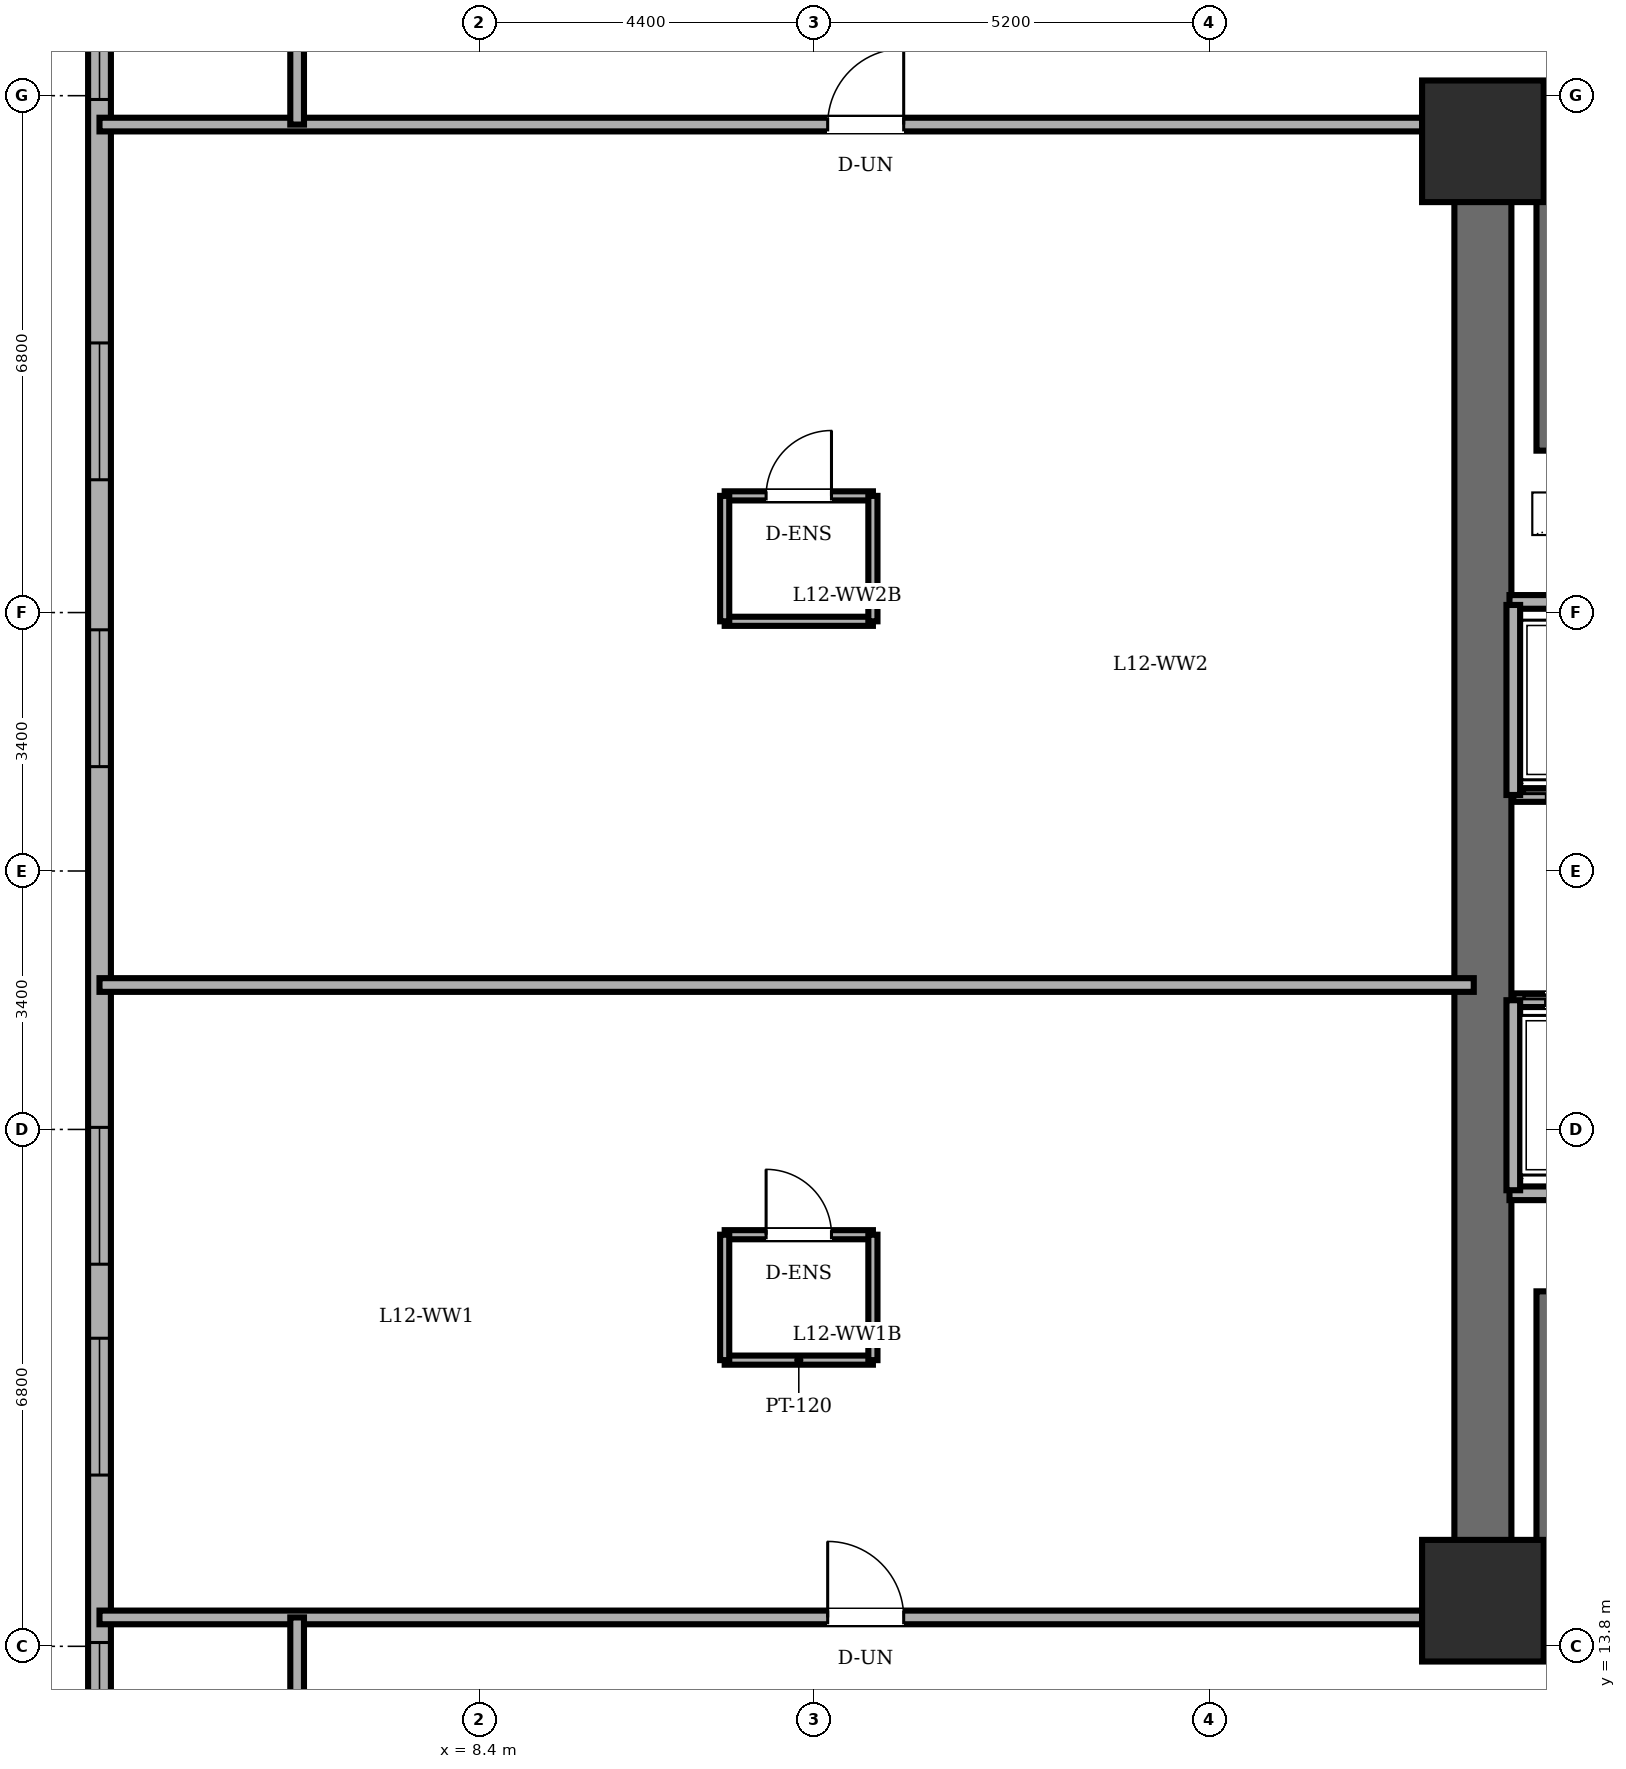
"""IFC4 building model, lengths in metres.
Left out: names, types, materials, properties, quantities, classifications, styles, units other than length and angle.
Written with IfcOpenShell. Run it as: python <this file> out.ifc"""

import sys

from ifc_helpers import new_model, si_unit, direction, frame, frame_2d, origin, origin_2d, place, context, subcontext, project, spatial, rectangle, extrude, element, fill, save


model = new_model("IFC4")
c1 = context("Model", 3, precision=1e-05, world=origin(), true_north=direction((0.0, 1.0)))
c2 = subcontext(c1, "Body", "Model", "MODEL_VIEW")
j1 = project(units=[si_unit("LENGTHUNIT", "METRE"), si_unit("PLANEANGLEUNIT", "RADIAN")], contexts=[c1])
p1 = place(None, origin())
s1 = spatial("IfcSite", under=j1, at=p1, CompositionType="ELEMENT")
p2 = place(p1, origin())
s2 = spatial("IfcBuilding", under=s1, at=p2, CompositionType="ELEMENT")
p3 = place(p2, frame((0.0, 0.0, 46.8)))
s3 = spatial("IfcBuildingStorey", under=s2, at=p3, CompositionType="ELEMENT", Elevation=46.8)
for number, where, z_axis, x_axis in (
    (1, (21.6, 14.4, 0.0), (0.0, 0.0, 1.0), (1.0, 0.0, 0.0)),
    (2, (21.6, 33.6, 0.0), (0.0, 0.0, 1.0), (1.0, 0.0, 0.0)),
):
    element("IfcColumn", number, at=place(p3, frame(where, z_axis=z_axis, x_axis=x_axis)), inside=s3, PredefinedType="COLUMN", context=c2, shape_type="SweptSolid", body=[
        extrude(rectangle(XDim=1.6, YDim=1.6, at=origin_2d()), origin(), (0.0, 0.0, 1.0), 3.6),
    ])
p4 = place(p3, frame((3.4, 40.2, 0.0), z_axis=(0.0, 0.0, 1.0), x_axis=(0.0, -1.0, 0.0)))
e3 = element("IfcWall", 3, at=p4, inside=s3, PredefinedType="SOLIDWALL", context=c2, shape_type="SweptSolid", body=[
    extrude(rectangle(XDim=32.4, YDim=0.3, at=frame_2d((16.2, 0.0))), origin(), (0.0, 0.0, 1.0), 3.4),
])
p5 = place(p4, frame((1.235, 0.0, 0.85)))
e4 = element("IfcOpeningElement", 4, at=p5, cuts=e3, PredefinedType="OPENING", context=c2, shape_type="SweptSolid", body=[
    extrude(rectangle(XDim=1.8, YDim=1.55, at=frame_2d((0.9, 0.775))), frame((0.0, 0.16, 0.0), z_axis=(0.0, -1.0, 0.0), x_axis=(1.0, 0.0, 0.0)), (0.0, 0.0, 1.0), 0.32),
])
p6 = place(p4, frame((4.25, 0.0, 0.85)))
e5 = element("IfcOpeningElement", 5, at=p6, cuts=e3, PredefinedType="OPENING", context=c2, shape_type="SweptSolid", body=[
    extrude(rectangle(XDim=1.8, YDim=1.55, at=frame_2d((0.9, 0.775))), frame((0.0, 0.16, 0.0), z_axis=(0.0, -1.0, 0.0), x_axis=(1.0, 0.0, 0.0)), (0.0, 0.0, 1.0), 0.32),
])
p7 = place(p4, frame((9.253, 0.0, 0.85)))
e6 = element("IfcOpeningElement", 6, at=p7, cuts=e3, PredefinedType="OPENING", context=c2, shape_type="SweptSolid", body=[
    extrude(rectangle(XDim=1.8, YDim=1.55, at=frame_2d((0.9, 0.775))), frame((0.0, 0.16, 0.0), z_axis=(0.0, -1.0, 0.0), x_axis=(1.0, 0.0, 0.0)), (0.0, 0.0, 1.0), 0.32),
])
p8 = place(p4, frame((13.027, 0.0, 0.85)))
e7 = element("IfcOpeningElement", 7, at=p8, cuts=e3, PredefinedType="OPENING", context=c2, shape_type="SweptSolid", body=[
    extrude(rectangle(XDim=1.8, YDim=1.55, at=frame_2d((0.9, 0.775))), frame((0.0, 0.16, 0.0), z_axis=(0.0, -1.0, 0.0), x_axis=(1.0, 0.0, 0.0)), (0.0, 0.0, 1.0), 0.32),
])
p9 = place(p4, frame((19.573, 0.0, 0.85)))
e8 = element("IfcOpeningElement", 8, at=p9, cuts=e3, PredefinedType="OPENING", context=c2, shape_type="SweptSolid", body=[
    extrude(rectangle(XDim=1.8, YDim=1.55, at=frame_2d((0.9, 0.775))), frame((0.0, 0.16, 0.0), z_axis=(0.0, -1.0, 0.0), x_axis=(1.0, 0.0, 0.0)), (0.0, 0.0, 1.0), 0.32),
])
p10 = place(p4, frame((22.347, 0.0, 0.85)))
e9 = element("IfcOpeningElement", 9, at=p10, cuts=e3, PredefinedType="OPENING", context=c2, shape_type="SweptSolid", body=[
    extrude(rectangle(XDim=1.8, YDim=1.55, at=frame_2d((0.9, 0.775))), frame((0.0, 0.16, 0.0), z_axis=(0.0, -1.0, 0.0), x_axis=(1.0, 0.0, 0.0)), (0.0, 0.0, 1.0), 0.32),
])
p11 = place(p4, frame((26.35, 0.0, 0.85)))
e10 = element("IfcOpeningElement", 10, at=p11, cuts=e3, PredefinedType="OPENING", context=c2, shape_type="SweptSolid", body=[
    extrude(rectangle(XDim=1.8, YDim=1.55, at=frame_2d((0.9, 0.775))), frame((0.0, 0.16, 0.0), z_axis=(0.0, -1.0, 0.0), x_axis=(1.0, 0.0, 0.0)), (0.0, 0.0, 1.0), 0.32),
])
p12 = place(p4, frame((29.365, 0.0, 0.85)))
e11 = element("IfcOpeningElement", 11, at=p12, cuts=e3, PredefinedType="OPENING", context=c2, shape_type="SweptSolid", body=[
    extrude(rectangle(XDim=1.8, YDim=1.55, at=frame_2d((0.9, 0.775))), frame((0.0, 0.16, 0.0), z_axis=(0.0, -1.0, 0.0), x_axis=(1.0, 0.0, 0.0)), (0.0, 0.0, 1.0), 0.32),
])
p13 = place(p3, frame((21.6, 14.4, 0.0), z_axis=(0.0, 0.0, 1.0), x_axis=(0.0, 1.0, 0.0)))
e12 = element("IfcWall", 12, at=p13, inside=s3, PredefinedType="SHEAR", context=c2, shape_type="SweptSolid", body=[
    extrude(rectangle(XDim=19.2, YDim=0.75, at=frame_2d((9.6, 0.0))), origin(), (0.0, 0.0, 1.0), 3.4),
])
for number, where, z_axis, x_axis in (
    (13, (21.6, 33.6, 0.0), (0.0, 0.0, 1.0), (1.0, 0.0, 0.0)),
    (14, (37.2, 14.4, 0.0), (0.0, 0.0, 1.0), (-1.0, 0.0, 0.0)),
):
    element("IfcWall", number, at=place(p3, frame(where, z_axis=z_axis, x_axis=x_axis)), inside=s3, PredefinedType="SHEAR", context=c2, shape_type="SweptSolid", body=[
        extrude(rectangle(XDim=15.6, YDim=0.75, at=frame_2d((7.8, 0.0))), origin(), (0.0, 0.0, 1.0), 3.4),
    ])
for number, where, z_axis, x_axis in (
    (15, (22.48, 29.53, 0.0), (0.0, 0.0, 1.0), (0.0, 1.0, 0.0)),
    (16, (22.48, 14.89, 0.0), (0.0, 0.0, 1.0), (0.0, 1.0, 0.0)),
):
    element("IfcWall", number, at=place(p3, frame(where, z_axis=z_axis, x_axis=x_axis)), inside=s3, PredefinedType="SOLIDWALL", context=c2, shape_type="SweptSolid", body=[
        extrude(rectangle(XDim=3.58, YDim=0.35, at=frame_2d((1.79, 0.0))), origin(), (0.0, 0.0, 1.0), 3.4),
    ])
p14 = place(p3, frame((21.95, 27.54, 0.0), z_axis=(0.0, 0.0, 1.0), x_axis=(1.0, 0.0, 0.0)))
e17 = element("IfcWall", 17, at=p14, inside=s3, PredefinedType="PARTITIONING", context=c2, shape_type="SweptSolid", body=[
    extrude(rectangle(XDim=10.56, YDim=0.18, at=frame_2d((5.28, 0.0))), origin(), (0.0, 0.0, 1.0), 3.4),
])
p15 = place(p3, frame((21.95, 19.76, 0.0), z_axis=(0.0, 0.0, 1.0), x_axis=(1.0, 0.0, 0.0)))
e18 = element("IfcWall", 18, at=p15, inside=s3, PredefinedType="PARTITIONING", context=c2, shape_type="SweptSolid", body=[
    extrude(rectangle(XDim=14.87, YDim=0.18, at=frame_2d((7.435, 0.0))), origin(), (0.0, 0.0, 1.0), 3.4),
])
p16 = place(p3, frame((24.02, 25.0, 0.0), z_axis=(0.0, 0.0, 1.0), x_axis=(-1.0, 0.0, 0.0)))
e19 = element("IfcWall", 19, at=p16, inside=s3, PredefinedType="PARTITIONING", context=c2, shape_type="SweptSolid", body=[
    extrude(rectangle(XDim=2.02, YDim=0.18, at=frame_2d((1.01, 0.0))), origin(), (0.0, 0.0, 1.0), 3.4),
])
p17 = place(p16, frame((0.435, 0.0, 0.0)))
e20 = element("IfcOpeningElement", 20, at=p17, cuts=e19, PredefinedType="OPENING", context=c2, shape_type="SweptSolid", body=[
    extrude(rectangle(XDim=1.15, YDim=2.2, at=frame_2d((0.575, 1.1))), frame((0.0, 0.1, 0.0), z_axis=(0.0, -1.0, 0.0), x_axis=(1.0, 0.0, 0.0)), (0.0, 0.0, 1.0), 0.2),
])
p18 = place(p3, frame((22.0, 27.5, 0.0), z_axis=(0.0, 0.0, 1.0), x_axis=(0.0, -1.0, 0.0)))
e21 = element("IfcWall", 21, at=p18, inside=s3, PredefinedType="PARTITIONING", context=c2, shape_type="SweptSolid", body=[
    extrude(rectangle(XDim=2.5, YDim=0.18, at=frame_2d((1.25, 0.0))), origin(), (0.0, 0.0, 1.0), 3.4),
])
p19 = place(p3, frame((22.0, 22.3, 0.0), z_axis=(0.0, 0.0, 1.0), x_axis=(1.0, 0.0, 0.0)))
e22 = element("IfcWall", 22, at=p19, inside=s3, PredefinedType="PARTITIONING", context=c2, shape_type="SweptSolid", body=[
    extrude(rectangle(XDim=2.0, YDim=0.18, at=frame_2d((1.0, 0.0))), origin(), (0.0, 0.0, 1.0), 3.4),
])
p20 = place(p19, frame((0.425, 0.0, 0.0)))
e23 = element("IfcOpeningElement", 23, at=p20, cuts=e22, PredefinedType="OPENING", context=c2, shape_type="SweptSolid", body=[
    extrude(rectangle(XDim=1.15, YDim=2.2, at=frame_2d((0.575, 1.1))), frame((0.0, 0.1, 0.0), z_axis=(0.0, -1.0, 0.0), x_axis=(1.0, 0.0, 0.0)), (0.0, 0.0, 1.0), 0.2),
])
p21 = place(p3, frame((22.0, 22.3, 0.0), z_axis=(0.0, 0.0, 1.0), x_axis=(0.0, -1.0, 0.0)))
e24 = element("IfcWall", 24, at=p21, inside=s3, PredefinedType="PARTITIONING", context=c2, shape_type="SweptSolid", body=[
    extrude(rectangle(XDim=2.5, YDim=0.18, at=frame_2d((1.25, 0.0))), origin(), (0.0, 0.0, 1.0), 3.4),
])
p22 = place(p3, frame((11.625, 19.215, 0.0), z_axis=(0.0, 0.0, 1.0), x_axis=(1.0, 0.0, 0.0)))
e25 = element("IfcWall", 25, at=p22, inside=s3, PredefinedType="PARTITIONING", context=c2, shape_type="SweptSolid", body=[
    extrude(rectangle(XDim=1.95, YDim=0.12, at=frame_2d((0.975, 0.0))), origin(), (0.0, 0.0, 1.0), 3.4),
])
p23 = place(p22, frame((0.545, 0.0, 0.0)))
e26 = element("IfcOpeningElement", 26, at=p23, cuts=e25, PredefinedType="OPENING", context=c2, shape_type="SweptSolid", body=[
    extrude(rectangle(XDim=0.86, YDim=2.1, at=frame_2d((0.43, 1.05))), frame((0.0, 0.07, 0.0), z_axis=(0.0, -1.0, 0.0), x_axis=(1.0, 0.0, 0.0)), (0.0, 0.0, 1.0), 0.14),
])
p24 = place(p3, frame((13.575, 17.565, 0.0), z_axis=(0.0, 0.0, 1.0), x_axis=(-1.0, 0.0, 0.0)))
e27 = element("IfcWall", 27, at=p24, inside=s3, PredefinedType="PARTITIONING", context=c2, shape_type="SweptSolid", body=[
    extrude(rectangle(XDim=1.95, YDim=0.12, at=frame_2d((0.975, 0.0))), origin(), (0.0, 0.0, 1.0), 3.4),
])
for number, where, z_axis, x_axis in (
    (28, (11.625, 19.215, 0.0), (0.0, 0.0, 1.0), (0.0, -1.0, 0.0)),
    (29, (13.575, 17.565, 0.0), (0.0, 0.0, 1.0), (0.0, 1.0, 0.0)),
):
    element("IfcWall", number, at=place(p3, frame(where, z_axis=z_axis, x_axis=x_axis)), inside=s3, PredefinedType="PARTITIONING", context=c2, shape_type="SweptSolid", body=[
        extrude(rectangle(XDim=1.65, YDim=0.12, at=frame_2d((0.825, 0.0))), origin(), (0.0, 0.0, 1.0), 3.4),
    ])
p25 = place(p3, frame((11.625, 28.935, 0.0), z_axis=(0.0, 0.0, 1.0), x_axis=(1.0, 0.0, 0.0)))
e30 = element("IfcWall", 30, at=p25, inside=s3, PredefinedType="PARTITIONING", context=c2, shape_type="SweptSolid", body=[
    extrude(rectangle(XDim=1.95, YDim=0.12, at=frame_2d((0.975, 0.0))), origin(), (0.0, 0.0, 1.0), 3.4),
])
p26 = place(p25, frame((0.545, 0.0, 0.0)))
e31 = element("IfcOpeningElement", 31, at=p26, cuts=e30, PredefinedType="OPENING", context=c2, shape_type="SweptSolid", body=[
    extrude(rectangle(XDim=0.86, YDim=2.1, at=frame_2d((0.43, 1.05))), frame((0.0, 0.07, 0.0), z_axis=(0.0, -1.0, 0.0), x_axis=(1.0, 0.0, 0.0)), (0.0, 0.0, 1.0), 0.14),
])
p27 = place(p3, frame((13.575, 27.285, 0.0), z_axis=(0.0, 0.0, 1.0), x_axis=(-1.0, 0.0, 0.0)))
e32 = element("IfcWall", 32, at=p27, inside=s3, PredefinedType="PARTITIONING", context=c2, shape_type="SweptSolid", body=[
    extrude(rectangle(XDim=1.95, YDim=0.12, at=frame_2d((0.975, 0.0))), origin(), (0.0, 0.0, 1.0), 3.4),
])
for number, where, z_axis, x_axis in (
    (33, (11.625, 28.935, 0.0), (0.0, 0.0, 1.0), (0.0, -1.0, 0.0)),
    (34, (13.575, 27.285, 0.0), (0.0, 0.0, 1.0), (0.0, 1.0, 0.0)),
):
    element("IfcWall", number, at=place(p3, frame(where, z_axis=z_axis, x_axis=x_axis)), inside=s3, PredefinedType="PARTITIONING", context=c2, shape_type="SweptSolid", body=[
        extrude(rectangle(XDim=1.65, YDim=0.12, at=frame_2d((0.825, 0.0))), origin(), (0.0, 0.0, 1.0), 3.4),
    ])
p28 = place(p3, frame((3.4, 14.18, 0.0), z_axis=(0.0, 0.0, 1.0), x_axis=(1.0, 0.0, 0.0)))
e35 = element("IfcWall", 35, at=p28, inside=s3, PredefinedType="PARTITIONING", context=c2, shape_type="SweptSolid", body=[
    extrude(rectangle(XDim=18.08, YDim=0.18, at=frame_2d((9.04, 0.0))), origin(), (0.0, 0.0, 1.0), 3.4),
])
p29 = place(p28, frame((9.58, 0.0, 0.0)))
e36 = element("IfcOpeningElement", 36, at=p29, cuts=e35, PredefinedType="OPENING", context=c2, shape_type="SweptSolid", body=[
    extrude(rectangle(XDim=1.0, YDim=2.15, at=frame_2d((0.5, 1.075))), frame((0.0, 0.1, 0.0), z_axis=(0.0, -1.0, 0.0), x_axis=(1.0, 0.0, 0.0)), (0.0, 0.0, 1.0), 0.2),
])
p30 = place(p3, frame((3.4, 22.5, 0.0), z_axis=(0.0, 0.0, 1.0), x_axis=(1.0, 0.0, 0.0)))
e37 = element("IfcWall", 37, at=p30, inside=s3, PredefinedType="PARTITIONING", context=c2, shape_type="SweptSolid", body=[
    extrude(rectangle(XDim=18.08, YDim=0.18, at=frame_2d((9.04, 0.0))), origin(), (0.0, 0.0, 1.0), 3.4),
])
p31 = place(p3, frame((3.4, 33.82, 0.0), z_axis=(0.0, 0.0, 1.0), x_axis=(1.0, 0.0, 0.0)))
e38 = element("IfcWall", 38, at=p31, inside=s3, PredefinedType="PARTITIONING", context=c2, shape_type="SweptSolid", body=[
    extrude(rectangle(XDim=18.08, YDim=0.18, at=frame_2d((9.04, 0.0))), origin(), (0.0, 0.0, 1.0), 3.4),
])
p32 = place(p31, frame((9.58, 0.0, 0.0)))
e39 = element("IfcOpeningElement", 39, at=p32, cuts=e38, PredefinedType="OPENING", context=c2, shape_type="SweptSolid", body=[
    extrude(rectangle(XDim=1.0, YDim=2.15, at=frame_2d((0.5, 1.075))), frame((0.0, 0.1, 0.0), z_axis=(0.0, -1.0, 0.0), x_axis=(1.0, 0.0, 0.0)), (0.0, 0.0, 1.0), 0.2),
])
for number, where, z_axis, x_axis in (
    (40, (6.0, 11.72, 0.0), (0.0, 0.0, 1.0), (0.0, 1.0, 0.0)),
    (41, (6.0, 33.82, 0.0), (0.0, 0.0, 1.0), (0.0, 1.0, 0.0)),
):
    element("IfcWall", number, at=place(p3, frame(where, z_axis=z_axis, x_axis=x_axis)), inside=s3, PredefinedType="PARTITIONING", context=c2, shape_type="SweptSolid", body=[
        extrude(rectangle(XDim=2.46, YDim=0.18, at=frame_2d((1.23, 0.0))), origin(), (0.0, 0.0, 1.0), 3.4),
    ])
p33 = place(p6, origin())
e42 = element("IfcWindow", 42, at=p33, inside=s3, PartitioningType="DOUBLE_PANEL_VERTICAL", PredefinedType="WINDOW", context=c2, shape_type="SweptSolid", body=[
    extrude(rectangle(XDim=1.8, YDim=1.55, at=frame_2d((0.9, 0.775))), frame((0.0, 0.03, 0.0), z_axis=(0.0, -1.0, 0.0), x_axis=(1.0, 0.0, 0.0)), (0.0, 0.0, 1.0), 0.06),
])
fill(e5, e42)
p34 = place(p7, origin())
e43 = element("IfcWindow", 43, at=p34, inside=s3, PartitioningType="DOUBLE_PANEL_VERTICAL", PredefinedType="WINDOW", context=c2, shape_type="SweptSolid", body=[
    extrude(rectangle(XDim=1.8, YDim=1.55, at=frame_2d((0.9, 0.775))), frame((0.0, 0.03, 0.0), z_axis=(0.0, -1.0, 0.0), x_axis=(1.0, 0.0, 0.0)), (0.0, 0.0, 1.0), 0.06),
])
fill(e6, e43)
p35 = place(p8, origin())
e44 = element("IfcWindow", 44, at=p35, inside=s3, PartitioningType="DOUBLE_PANEL_VERTICAL", PredefinedType="WINDOW", context=c2, shape_type="SweptSolid", body=[
    extrude(rectangle(XDim=1.8, YDim=1.55, at=frame_2d((0.9, 0.775))), frame((0.0, 0.03, 0.0), z_axis=(0.0, -1.0, 0.0), x_axis=(1.0, 0.0, 0.0)), (0.0, 0.0, 1.0), 0.06),
])
fill(e7, e44)
p36 = place(p9, origin())
e45 = element("IfcWindow", 45, at=p36, inside=s3, PartitioningType="DOUBLE_PANEL_VERTICAL", PredefinedType="WINDOW", context=c2, shape_type="SweptSolid", body=[
    extrude(rectangle(XDim=1.8, YDim=1.55, at=frame_2d((0.9, 0.775))), frame((0.0, 0.03, 0.0), z_axis=(0.0, -1.0, 0.0), x_axis=(1.0, 0.0, 0.0)), (0.0, 0.0, 1.0), 0.06),
])
fill(e8, e45)
p37 = place(p10, origin())
e46 = element("IfcWindow", 46, at=p37, inside=s3, PartitioningType="DOUBLE_PANEL_VERTICAL", PredefinedType="WINDOW", context=c2, shape_type="SweptSolid", body=[
    extrude(rectangle(XDim=1.8, YDim=1.55, at=frame_2d((0.9, 0.775))), frame((0.0, 0.03, 0.0), z_axis=(0.0, -1.0, 0.0), x_axis=(1.0, 0.0, 0.0)), (0.0, 0.0, 1.0), 0.06),
])
fill(e9, e46)
p38 = place(p11, origin())
e47 = element("IfcWindow", 47, at=p38, inside=s3, PartitioningType="DOUBLE_PANEL_VERTICAL", PredefinedType="WINDOW", context=c2, shape_type="SweptSolid", body=[
    extrude(rectangle(XDim=1.8, YDim=1.55, at=frame_2d((0.9, 0.775))), frame((0.0, 0.03, 0.0), z_axis=(0.0, -1.0, 0.0), x_axis=(1.0, 0.0, 0.0)), (0.0, 0.0, 1.0), 0.06),
])
fill(e10, e47)
p39 = place(p20, origin())
e48 = element("IfcDoor", 48, at=p39, inside=s3, OperationType="DOUBLE_DOOR_SLIDING", PredefinedType="DOOR", context=c2, shape_type="SweptSolid", body=[
    extrude(rectangle(XDim=1.15, YDim=2.2, at=frame_2d((0.575, 1.1))), frame((0.0, 0.025, 0.0), z_axis=(0.0, -1.0, 0.0), x_axis=(1.0, 0.0, 0.0)), (0.0, 0.0, 1.0), 0.05),
])
fill(e23, e48)
p40 = place(p23, origin())
e49 = element("IfcDoor", 49, at=p40, inside=s3, OperationType="SINGLE_SWING_LEFT", PredefinedType="DOOR", context=c2, shape_type="SweptSolid", body=[
    extrude(rectangle(XDim=0.86, YDim=2.1, at=frame_2d((0.43, 1.05))), frame((0.0, 0.025, 0.0), z_axis=(0.0, -1.0, 0.0), x_axis=(1.0, 0.0, 0.0)), (0.0, 0.0, 1.0), 0.05),
])
fill(e26, e49)
p41 = place(p26, origin())
e50 = element("IfcDoor", 50, at=p41, inside=s3, OperationType="SINGLE_SWING_RIGHT", PredefinedType="DOOR", context=c2, shape_type="SweptSolid", body=[
    extrude(rectangle(XDim=0.86, YDim=2.1, at=frame_2d((0.43, 1.05))), frame((0.0, 0.025, 0.0), z_axis=(0.0, -1.0, 0.0), x_axis=(1.0, 0.0, 0.0)), (0.0, 0.0, 1.0), 0.05),
])
fill(e31, e50)
p42 = place(p29, origin())
e51 = element("IfcDoor", 51, at=p42, inside=s3, OperationType="SINGLE_SWING_LEFT", PredefinedType="DOOR", context=c2, shape_type="SweptSolid", body=[
    extrude(rectangle(XDim=1.0, YDim=2.15, at=frame_2d((0.5, 1.075))), frame((0.0, 0.025, 0.0), z_axis=(0.0, -1.0, 0.0), x_axis=(1.0, 0.0, 0.0)), (0.0, 0.0, 1.0), 0.05),
])
fill(e36, e51)
p43 = place(p32, origin())
e52 = element("IfcDoor", 52, at=p43, inside=s3, OperationType="SINGLE_SWING_RIGHT", PredefinedType="DOOR", context=c2, shape_type="SweptSolid", body=[
    extrude(rectangle(XDim=1.0, YDim=2.15, at=frame_2d((0.5, 1.075))), frame((0.0, 0.025, 0.0), z_axis=(0.0, -1.0, 0.0), x_axis=(1.0, 0.0, 0.0)), (0.0, 0.0, 1.0), 0.05),
])
fill(e39, e52)
save(model, sys.argv[1])
